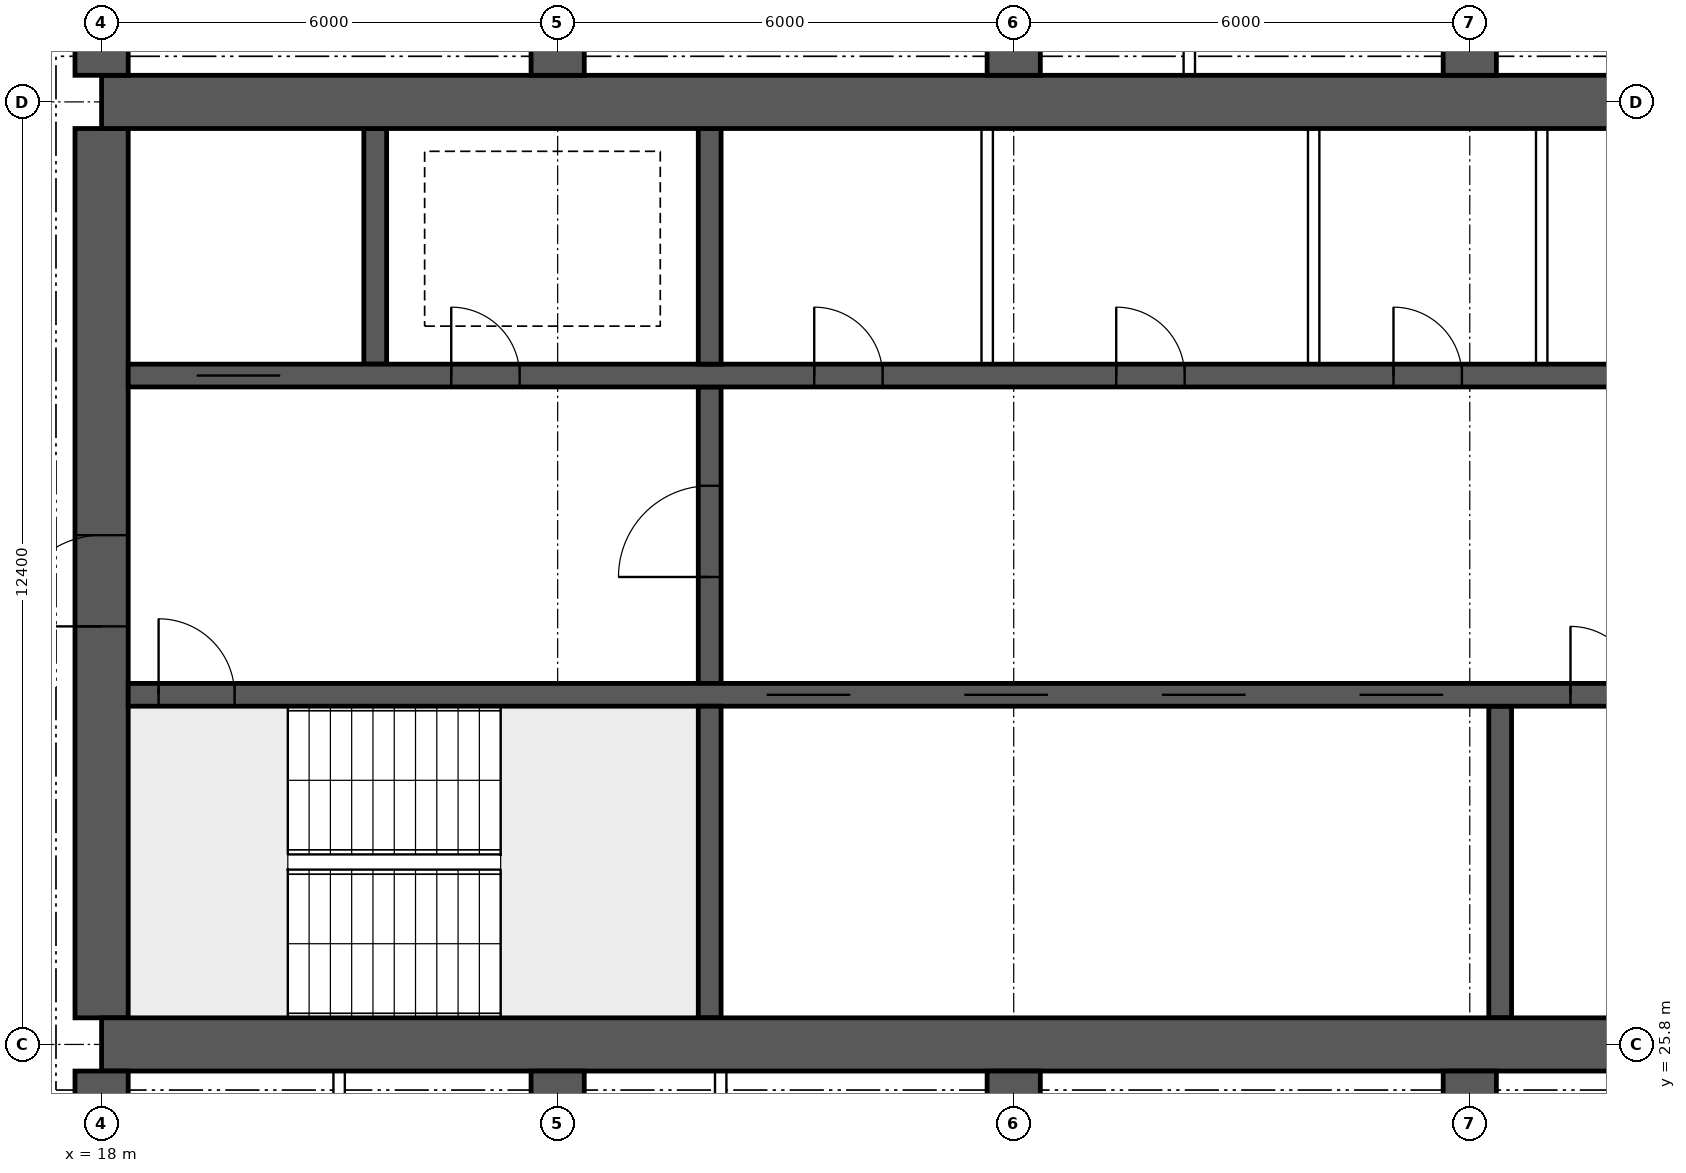
"""IFC4 building model, lengths in metres.
Left out: names, types, materials, properties, quantities, classifications, styles, units other than length and angle.
Written with IfcOpenShell. Run it as: python <this file> out.ifc"""

import sys

from ifc_helpers import new_model, si_unit, direction, frame, frame_2d, origin, place, context, subcontext, project, spatial, rectangle, extrude, element, fill, save


model = new_model("IFC4")
c1 = context("Model", 3, precision=1e-05, world=origin(), true_north=direction((0.0, 1.0)))
c2 = subcontext(c1, "Body", "Model", "MODEL_VIEW")
j1 = project(units=[si_unit("LENGTHUNIT", "METRE"), si_unit("PLANEANGLEUNIT", "RADIAN")], contexts=[c1])
p1 = place(None, origin())
s1 = spatial("IfcSite", under=j1, at=p1, CompositionType="ELEMENT")
p2 = place(p1, origin())
s2 = spatial("IfcBuilding", under=s1, at=p2, CompositionType="ELEMENT")
p3 = place(p2, frame((0.0, 0.0, 227.8)))
s3 = spatial("IfcBuildingStorey", under=s2, at=p3, CompositionType="ELEMENT", Elevation=227.8)
for number, where, z_axis, x_axis in (
    (1, (18.0, 25.8, 0.0), (0.0, 0.0, 1.0), (1.0, 0.0, 0.0)),
    (2, (18.0, 38.2, 0.0), (0.0, 0.0, 1.0), (1.0, 0.0, 0.0)),
):
    element("IfcWall", number, at=place(p3, frame(where, z_axis=z_axis, x_axis=x_axis)), inside=s3, PredefinedType="SHEAR", context=c2, shape_type="SweptSolid", body=[
        extrude(rectangle(XDim=48.0, YDim=0.7, at=frame_2d((24.0, 0.0))), origin(), (0.0, 0.0, 1.0), 3.75),
    ])
p4 = place(p3, frame((18.0, 26.15, 0.0), z_axis=(0.0, 0.0, 1.0), x_axis=(0.0, 1.0, 0.0)))
e3 = element("IfcWall", 3, at=p4, inside=s3, PredefinedType="SHEAR", context=c2, shape_type="SweptSolid", body=[
    extrude(rectangle(XDim=11.7, YDim=0.7, at=frame_2d((5.85, 0.0))), origin(), (0.0, 0.0, 1.0), 3.75),
])
p5 = place(p4, frame((5.15, 0.0, 0.0)))
e4 = element("IfcOpeningElement", 4, at=p5, cuts=e3, PredefinedType="OPENING", context=c2, shape_type="SweptSolid", body=[
    extrude(rectangle(XDim=1.2, YDim=2.1, at=frame_2d((0.6, 1.05))), frame((0.0, 0.36, 0.0), z_axis=(0.0, -1.0, 0.0), x_axis=(1.0, 0.0, 0.0)), (0.0, 0.0, 1.0), 0.72),
])
p6 = place(p3, frame((18.35, 30.4, 0.0), z_axis=(0.0, 0.0, 1.0), x_axis=(1.0, 0.0, 0.0)))
e5 = element("IfcWall", 5, at=p6, inside=s3, PredefinedType="SHEAR", context=c2, shape_type="SweptSolid", body=[
    extrude(rectangle(XDim=47.3, YDim=0.3, at=frame_2d((23.65, 0.0))), origin(), (0.0, 0.0, 1.0), 3.75),
])
p7 = place(p6, frame((0.4, 0.0, 0.0)))
e6 = element("IfcOpeningElement", 6, at=p7, cuts=e5, PredefinedType="OPENING", context=c2, shape_type="SweptSolid", body=[
    extrude(rectangle(XDim=1.0, YDim=2.1, at=frame_2d((0.5, 1.05))), frame((0.0, 0.16, 0.0), z_axis=(0.0, -1.0, 0.0), x_axis=(1.0, 0.0, 0.0)), (0.0, 0.0, 1.0), 0.32),
])
p8 = place(p6, frame((45.9, 0.0, 0.0)))
e7 = element("IfcOpeningElement", 7, at=p8, cuts=e5, PredefinedType="OPENING", context=c2, shape_type="SweptSolid", body=[
    extrude(rectangle(XDim=1.0, YDim=2.1, at=frame_2d((0.5, 1.05))), frame((0.0, 0.16, 0.0), z_axis=(0.0, -1.0, 0.0), x_axis=(1.0, 0.0, 0.0)), (0.0, 0.0, 1.0), 0.32),
])
p9 = place(p6, frame((8.4, 0.0, 0.0)))
e8 = element("IfcOpeningElement", 8, at=p9, cuts=e5, PredefinedType="OPENING", context=c2, shape_type="SweptSolid", body=[
    extrude(rectangle(XDim=1.1, YDim=2.1, at=frame_2d((0.55, 1.05))), frame((0.0, 0.16, 0.0), z_axis=(0.0, -1.0, 0.0), x_axis=(1.0, 0.0, 0.0)), (0.0, 0.0, 1.0), 0.32),
])
p10 = place(p6, frame((11.0, 0.0, 0.0)))
e9 = element("IfcOpeningElement", 9, at=p10, cuts=e5, PredefinedType="OPENING", context=c2, shape_type="SweptSolid", body=[
    extrude(rectangle(XDim=1.1, YDim=2.1, at=frame_2d((0.55, 1.05))), frame((0.0, 0.16, 0.0), z_axis=(0.0, -1.0, 0.0), x_axis=(1.0, 0.0, 0.0)), (0.0, 0.0, 1.0), 0.32),
])
p11 = place(p6, frame((13.6, 0.0, 0.0)))
e10 = element("IfcOpeningElement", 10, at=p11, cuts=e5, PredefinedType="OPENING", context=c2, shape_type="SweptSolid", body=[
    extrude(rectangle(XDim=1.1, YDim=2.1, at=frame_2d((0.55, 1.05))), frame((0.0, 0.16, 0.0), z_axis=(0.0, -1.0, 0.0), x_axis=(1.0, 0.0, 0.0)), (0.0, 0.0, 1.0), 0.32),
])
p12 = place(p6, frame((16.2, 0.0, 0.0)))
e11 = element("IfcOpeningElement", 11, at=p12, cuts=e5, PredefinedType="OPENING", context=c2, shape_type="SweptSolid", body=[
    extrude(rectangle(XDim=1.1, YDim=2.1, at=frame_2d((0.55, 1.05))), frame((0.0, 0.16, 0.0), z_axis=(0.0, -1.0, 0.0), x_axis=(1.0, 0.0, 0.0)), (0.0, 0.0, 1.0), 0.32),
])
p13 = place(p6, frame((18.975, 0.0, 0.0)))
e12 = element("IfcOpeningElement", 12, at=p13, cuts=e5, PredefinedType="OPENING", context=c2, shape_type="SweptSolid", body=[
    extrude(rectangle(XDim=0.9, YDim=2.1, at=frame_2d((0.45, 1.05))), frame((0.0, 0.16, 0.0), z_axis=(0.0, -1.0, 0.0), x_axis=(1.0, 0.0, 0.0)), (0.0, 0.0, 1.0), 0.32),
])
p14 = place(p6, frame((24.475, 0.0, 0.0)))
e13 = element("IfcOpeningElement", 13, at=p14, cuts=e5, PredefinedType="OPENING", context=c2, shape_type="SweptSolid", body=[
    extrude(rectangle(XDim=0.9, YDim=2.1, at=frame_2d((0.45, 1.05))), frame((0.0, 0.16, 0.0), z_axis=(0.0, -1.0, 0.0), x_axis=(1.0, 0.0, 0.0)), (0.0, 0.0, 1.0), 0.32),
])
p15 = place(p6, frame((30.267, 0.0, 0.0)))
e14 = element("IfcOpeningElement", 14, at=p15, cuts=e5, PredefinedType="OPENING", context=c2, shape_type="SweptSolid", body=[
    extrude(rectangle(XDim=1.1, YDim=2.1, at=frame_2d((0.55, 1.05))), frame((0.0, 0.16, 0.0), z_axis=(0.0, -1.0, 0.0), x_axis=(1.0, 0.0, 0.0)), (0.0, 0.0, 1.0), 0.32),
])
p16 = place(p6, frame((33.8, 0.0, 0.0)))
e15 = element("IfcOpeningElement", 15, at=p16, cuts=e5, PredefinedType="OPENING", context=c2, shape_type="SweptSolid", body=[
    extrude(rectangle(XDim=1.1, YDim=2.1, at=frame_2d((0.55, 1.05))), frame((0.0, 0.16, 0.0), z_axis=(0.0, -1.0, 0.0), x_axis=(1.0, 0.0, 0.0)), (0.0, 0.0, 1.0), 0.32),
])
p17 = place(p6, frame((37.333, 0.0, 0.0)))
e16 = element("IfcOpeningElement", 16, at=p17, cuts=e5, PredefinedType="OPENING", context=c2, shape_type="SweptSolid", body=[
    extrude(rectangle(XDim=1.1, YDim=2.1, at=frame_2d((0.55, 1.05))), frame((0.0, 0.16, 0.0), z_axis=(0.0, -1.0, 0.0), x_axis=(1.0, 0.0, 0.0)), (0.0, 0.0, 1.0), 0.32),
])
p18 = place(p3, frame((18.35, 34.6, 0.0), z_axis=(0.0, 0.0, 1.0), x_axis=(1.0, 0.0, 0.0)))
e17 = element("IfcWall", 17, at=p18, inside=s3, PredefinedType="SHEAR", context=c2, shape_type="SweptSolid", body=[
    extrude(rectangle(XDim=47.3, YDim=0.3, at=frame_2d((23.65, 0.0))), origin(), (0.0, 0.0, 1.0), 3.75),
])
p19 = place(p18, frame((0.9, 0.0, 0.0)))
e18 = element("IfcOpeningElement", 18, at=p19, cuts=e17, PredefinedType="OPENING", context=c2, shape_type="SweptSolid", body=[
    extrude(rectangle(XDim=1.1, YDim=2.1, at=frame_2d((0.55, 1.05))), frame((0.0, 0.16, 0.0), z_axis=(0.0, -1.0, 0.0), x_axis=(1.0, 0.0, 0.0)), (0.0, 0.0, 1.0), 0.32),
])
p20 = place(p18, frame((45.3, 0.0, 0.0)))
e19 = element("IfcOpeningElement", 19, at=p20, cuts=e17, PredefinedType="OPENING", context=c2, shape_type="SweptSolid", body=[
    extrude(rectangle(XDim=1.1, YDim=2.1, at=frame_2d((0.55, 1.05))), frame((0.0, 0.16, 0.0), z_axis=(0.0, -1.0, 0.0), x_axis=(1.0, 0.0, 0.0)), (0.0, 0.0, 1.0), 0.32),
])
p21 = place(p18, frame((4.25, 0.0, 0.0)))
e20 = element("IfcOpeningElement", 20, at=p21, cuts=e17, PredefinedType="OPENING", context=c2, shape_type="SweptSolid", body=[
    extrude(rectangle(XDim=0.9, YDim=2.1, at=frame_2d((0.45, 1.05))), frame((0.0, 0.16, 0.0), z_axis=(0.0, -1.0, 0.0), x_axis=(1.0, 0.0, 0.0)), (0.0, 0.0, 1.0), 0.32),
])
p22 = place(p18, frame((42.15, 0.0, 0.0)))
e21 = element("IfcOpeningElement", 21, at=p22, cuts=e17, PredefinedType="OPENING", context=c2, shape_type="SweptSolid", body=[
    extrude(rectangle(XDim=0.9, YDim=2.1, at=frame_2d((0.45, 1.05))), frame((0.0, 0.16, 0.0), z_axis=(0.0, -1.0, 0.0), x_axis=(1.0, 0.0, 0.0)), (0.0, 0.0, 1.0), 0.32),
])
p23 = place(p18, frame((9.025, 0.0, 0.0)))
e22 = element("IfcOpeningElement", 22, at=p23, cuts=e17, PredefinedType="OPENING", context=c2, shape_type="SweptSolid", body=[
    extrude(rectangle(XDim=0.9, YDim=2.1, at=frame_2d((0.45, 1.05))), frame((0.0, 0.16, 0.0), z_axis=(0.0, -1.0, 0.0), x_axis=(1.0, 0.0, 0.0)), (0.0, 0.0, 1.0), 0.32),
])
p24 = place(p18, frame((12.999, 0.0, 0.0)))
e23 = element("IfcOpeningElement", 23, at=p24, cuts=e17, PredefinedType="OPENING", context=c2, shape_type="SweptSolid", body=[
    extrude(rectangle(XDim=0.9, YDim=2.1, at=frame_2d((0.45, 1.05))), frame((0.0, 0.16, 0.0), z_axis=(0.0, -1.0, 0.0), x_axis=(1.0, 0.0, 0.0)), (0.0, 0.0, 1.0), 0.32),
])
p25 = place(p18, frame((16.646, 0.0, 0.0)))
e24 = element("IfcOpeningElement", 24, at=p25, cuts=e17, PredefinedType="OPENING", context=c2, shape_type="SweptSolid", body=[
    extrude(rectangle(XDim=0.9, YDim=2.1, at=frame_2d((0.45, 1.05))), frame((0.0, 0.16, 0.0), z_axis=(0.0, -1.0, 0.0), x_axis=(1.0, 0.0, 0.0)), (0.0, 0.0, 1.0), 0.32),
])
p26 = place(p18, frame((20.405, 0.0, 0.0)))
e25 = element("IfcOpeningElement", 25, at=p26, cuts=e17, PredefinedType="OPENING", context=c2, shape_type="SweptSolid", body=[
    extrude(rectangle(XDim=0.9, YDim=2.1, at=frame_2d((0.45, 1.05))), frame((0.0, 0.16, 0.0), z_axis=(0.0, -1.0, 0.0), x_axis=(1.0, 0.0, 0.0)), (0.0, 0.0, 1.0), 0.32),
])
p27 = place(p18, frame((24.811, 0.0, 0.0)))
e26 = element("IfcOpeningElement", 26, at=p27, cuts=e17, PredefinedType="OPENING", context=c2, shape_type="SweptSolid", body=[
    extrude(rectangle(XDim=0.9, YDim=2.1, at=frame_2d((0.45, 1.05))), frame((0.0, 0.16, 0.0), z_axis=(0.0, -1.0, 0.0), x_axis=(1.0, 0.0, 0.0)), (0.0, 0.0, 1.0), 0.32),
])
p28 = place(p18, frame((27.608, 0.0, 0.0)))
e27 = element("IfcOpeningElement", 27, at=p28, cuts=e17, PredefinedType="OPENING", context=c2, shape_type="SweptSolid", body=[
    extrude(rectangle(XDim=0.9, YDim=2.1, at=frame_2d((0.45, 1.05))), frame((0.0, 0.16, 0.0), z_axis=(0.0, -1.0, 0.0), x_axis=(1.0, 0.0, 0.0)), (0.0, 0.0, 1.0), 0.32),
])
p29 = place(p18, frame((33.729, 0.0, 0.0)))
e28 = element("IfcOpeningElement", 28, at=p29, cuts=e17, PredefinedType="OPENING", context=c2, shape_type="SweptSolid", body=[
    extrude(rectangle(XDim=0.9, YDim=2.1, at=frame_2d((0.45, 1.05))), frame((0.0, 0.16, 0.0), z_axis=(0.0, -1.0, 0.0), x_axis=(1.0, 0.0, 0.0)), (0.0, 0.0, 1.0), 0.32),
])
p30 = place(p3, frame((26.0, 26.15, 0.0), z_axis=(0.0, 0.0, 1.0), x_axis=(0.0, 1.0, 0.0)))
e29 = element("IfcWall", 29, at=p30, inside=s3, PredefinedType="SHEAR", context=c2, shape_type="SweptSolid", body=[
    extrude(rectangle(XDim=4.1, YDim=0.3, at=frame_2d((2.05, 0.0))), origin(), (0.0, 0.0, 1.0), 3.75),
])
p31 = place(p3, frame((26.0, 30.55, 0.0), z_axis=(0.0, 0.0, 1.0), x_axis=(0.0, 1.0, 0.0)))
e30 = element("IfcWall", 30, at=p31, inside=s3, PredefinedType="SHEAR", context=c2, shape_type="SweptSolid", body=[
    extrude(rectangle(XDim=3.9, YDim=0.3, at=frame_2d((1.95, 0.0))), origin(), (0.0, 0.0, 1.0), 3.75),
])
p32 = place(p31, frame((1.4, 0.0, 0.0)))
e31 = element("IfcOpeningElement", 31, at=p32, cuts=e30, PredefinedType="OPENING", context=c2, shape_type="SweptSolid", body=[
    extrude(rectangle(XDim=1.2, YDim=2.1, at=frame_2d((0.6, 1.05))), frame((0.0, 0.16, 0.0), z_axis=(0.0, -1.0, 0.0), x_axis=(1.0, 0.0, 0.0)), (0.0, 0.0, 1.0), 0.32),
])
for number, where, z_axis, x_axis in (
    (32, (21.6, 34.75, 0.0), (0.0, 0.0, 1.0), (0.0, 1.0, 0.0)),
    (33, (26.0, 34.75, 0.0), (0.0, 0.0, 1.0), (0.0, 1.0, 0.0)),
):
    element("IfcWall", number, at=place(p3, frame(where, z_axis=z_axis, x_axis=x_axis)), inside=s3, PredefinedType="SHEAR", context=c2, shape_type="SweptSolid", body=[
        extrude(rectangle(XDim=3.1, YDim=0.3, at=frame_2d((1.55, 0.0))), origin(), (0.0, 0.0, 1.0), 3.75),
    ])
p33 = place(p3, frame((36.4, 26.15, 0.0), z_axis=(0.0, 0.0, 1.0), x_axis=(0.0, 1.0, 0.0)))
e34 = element("IfcWall", 34, at=p33, inside=s3, PredefinedType="SHEAR", context=c2, shape_type="SweptSolid", body=[
    extrude(rectangle(XDim=4.1, YDim=0.3, at=frame_2d((2.05, 0.0))), origin(), (0.0, 0.0, 1.0), 3.75),
])
for number, where, z_axis, x_axis in (
    (35, (18.0, 18.4, 0.0), (0.0, 0.0, 1.0), (0.0, 1.0, 0.0)),
    (36, (18.0, 38.55, 0.0), (0.0, 0.0, 1.0), (0.0, 1.0, 0.0)),
    (37, (24.0, 18.4, 0.0), (0.0, 0.0, 1.0), (0.0, 1.0, 0.0)),
    (38, (24.0, 38.55, 0.0), (0.0, 0.0, 1.0), (0.0, 1.0, 0.0)),
    (39, (30.0, 18.4, 0.0), (0.0, 0.0, 1.0), (0.0, 1.0, 0.0)),
    (40, (30.0, 38.55, 0.0), (0.0, 0.0, 1.0), (0.0, 1.0, 0.0)),
    (41, (36.0, 18.4, 0.0), (0.0, 0.0, 1.0), (0.0, 1.0, 0.0)),
    (42, (36.0, 38.55, 0.0), (0.0, 0.0, 1.0), (0.0, 1.0, 0.0)),
):
    element("IfcWall", number, at=place(p3, frame(where, z_axis=z_axis, x_axis=x_axis)), inside=s3, PredefinedType="SHEAR", context=c2, shape_type="SweptSolid", body=[
        extrude(rectangle(XDim=7.05, YDim=0.7, at=frame_2d((3.525, 0.0))), origin(), (0.0, 0.0, 1.0), 3.75),
    ])
for number, where, z_axis, x_axis in (
    (43, (29.651, 34.75, 0.0), (0.0, 0.0, 1.0), (0.0, 1.0, 0.0)),
    (44, (33.946, 34.75, 0.0), (0.0, 0.0, 1.0), (0.0, 1.0, 0.0)),
    (45, (36.946, 34.75, 0.0), (0.0, 0.0, 1.0), (0.0, 1.0, 0.0)),
):
    element("IfcWall", number, at=place(p3, frame(where, z_axis=z_axis, x_axis=x_axis)), inside=s3, PredefinedType="SOLIDWALL", context=c2, shape_type="SweptSolid", body=[
        extrude(rectangle(XDim=3.1, YDim=0.15, at=frame_2d((1.55, 0.0))), origin(), (0.0, 0.0, 1.0), 3.3),
    ])
for number, where, z_axis, x_axis in (
    (46, (21.125, 18.5, 0.0), (0.0, 0.0, 1.0), (0.0, 1.0, 0.0)),
    (47, (26.145, 18.5, 0.0), (0.0, 0.0, 1.0), (0.0, 1.0, 0.0)),
    (48, (32.31, 38.55, 0.0), (0.0, 0.0, 1.0), (0.0, 1.0, 0.0)),
):
    element("IfcWall", number, at=place(p3, frame(where, z_axis=z_axis, x_axis=x_axis)), inside=s3, PredefinedType="PARTITIONING", context=c2, shape_type="SweptSolid", body=[
        extrude(rectangle(XDim=6.95, YDim=0.15, at=frame_2d((3.475, 0.0))), origin(), (0.0, 0.0, 1.0), 3.3),
    ])
p34 = place(p5, origin())
e49 = element("IfcDoor", 49, at=p34, inside=s3, OperationType="SINGLE_SWING_LEFT", PredefinedType="DOOR", context=c2, shape_type="SweptSolid", body=[
    extrude(rectangle(XDim=1.2, YDim=2.1, at=frame_2d((0.6, 1.05))), frame((0.0, 0.025, 0.0), z_axis=(0.0, -1.0, 0.0), x_axis=(1.0, 0.0, 0.0)), (0.0, 0.0, 1.0), 0.05),
])
fill(e4, e49)
p35 = place(p7, origin())
e50 = element("IfcDoor", 50, at=p35, inside=s3, OperationType="SINGLE_SWING_LEFT", PredefinedType="DOOR", context=c2, shape_type="SweptSolid", body=[
    extrude(rectangle(XDim=1.0, YDim=2.1, at=frame_2d((0.5, 1.05))), frame((0.0, 0.025, 0.0), z_axis=(0.0, -1.0, 0.0), x_axis=(1.0, 0.0, 0.0)), (0.0, 0.0, 1.0), 0.05),
])
fill(e6, e50)
p36 = place(p19, origin())
e51 = element("IfcDoor", 51, at=p36, inside=s3, OperationType="DOUBLE_DOOR_SLIDING", PredefinedType="DOOR", context=c2, shape_type="SweptSolid", body=[
    extrude(rectangle(XDim=1.1, YDim=2.1, at=frame_2d((0.55, 1.05))), frame((0.0, 0.025, 0.0), z_axis=(0.0, -1.0, 0.0), x_axis=(1.0, 0.0, 0.0)), (0.0, 0.0, 1.0), 0.05),
])
fill(e18, e51)
p37 = place(p21, origin())
e52 = element("IfcDoor", 52, at=p37, inside=s3, OperationType="SINGLE_SWING_LEFT", PredefinedType="DOOR", context=c2, shape_type="SweptSolid", body=[
    extrude(rectangle(XDim=0.9, YDim=2.1, at=frame_2d((0.45, 1.05))), frame((0.0, 0.025, 0.0), z_axis=(0.0, -1.0, 0.0), x_axis=(1.0, 0.0, 0.0)), (0.0, 0.0, 1.0), 0.05),
])
fill(e20, e52)
p38 = place(p32, origin())
e53 = element("IfcDoor", 53, at=p38, inside=s3, OperationType="SINGLE_SWING_LEFT", PredefinedType="DOOR", context=c2, shape_type="SweptSolid", body=[
    extrude(rectangle(XDim=1.2, YDim=2.1, at=frame_2d((0.6, 1.05))), frame((0.0, 0.025, 0.0), z_axis=(0.0, -1.0, 0.0), x_axis=(1.0, 0.0, 0.0)), (0.0, 0.0, 1.0), 0.05),
])
fill(e31, e53)
p39 = place(p23, origin())
e54 = element("IfcDoor", 54, at=p39, inside=s3, OperationType="SINGLE_SWING_LEFT", PredefinedType="DOOR", context=c2, shape_type="SweptSolid", body=[
    extrude(rectangle(XDim=0.9, YDim=2.1, at=frame_2d((0.45, 1.05))), frame((0.0, 0.025, 0.0), z_axis=(0.0, -1.0, 0.0), x_axis=(1.0, 0.0, 0.0)), (0.0, 0.0, 1.0), 0.05),
])
fill(e22, e54)
p40 = place(p24, origin())
e55 = element("IfcDoor", 55, at=p40, inside=s3, OperationType="SINGLE_SWING_LEFT", PredefinedType="DOOR", context=c2, shape_type="SweptSolid", body=[
    extrude(rectangle(XDim=0.9, YDim=2.1, at=frame_2d((0.45, 1.05))), frame((0.0, 0.025, 0.0), z_axis=(0.0, -1.0, 0.0), x_axis=(1.0, 0.0, 0.0)), (0.0, 0.0, 1.0), 0.05),
])
fill(e23, e55)
p41 = place(p25, origin())
e56 = element("IfcDoor", 56, at=p41, inside=s3, OperationType="SINGLE_SWING_LEFT", PredefinedType="DOOR", context=c2, shape_type="SweptSolid", body=[
    extrude(rectangle(XDim=0.9, YDim=2.1, at=frame_2d((0.45, 1.05))), frame((0.0, 0.025, 0.0), z_axis=(0.0, -1.0, 0.0), x_axis=(1.0, 0.0, 0.0)), (0.0, 0.0, 1.0), 0.05),
])
fill(e24, e56)
p42 = place(p9, origin())
e57 = element("IfcDoor", 57, at=p42, inside=s3, OperationType="DOUBLE_DOOR_SLIDING", PredefinedType="DOOR", context=c2, shape_type="SweptSolid", body=[
    extrude(rectangle(XDim=1.1, YDim=2.1, at=frame_2d((0.55, 1.05))), frame((0.0, 0.025, 0.0), z_axis=(0.0, -1.0, 0.0), x_axis=(1.0, 0.0, 0.0)), (0.0, 0.0, 1.0), 0.05),
])
fill(e8, e57)
p43 = place(p10, origin())
e58 = element("IfcDoor", 58, at=p43, inside=s3, OperationType="DOUBLE_DOOR_SLIDING", PredefinedType="DOOR", context=c2, shape_type="SweptSolid", body=[
    extrude(rectangle(XDim=1.1, YDim=2.1, at=frame_2d((0.55, 1.05))), frame((0.0, 0.025, 0.0), z_axis=(0.0, -1.0, 0.0), x_axis=(1.0, 0.0, 0.0)), (0.0, 0.0, 1.0), 0.05),
])
fill(e9, e58)
p44 = place(p11, origin())
e59 = element("IfcDoor", 59, at=p44, inside=s3, OperationType="DOUBLE_DOOR_SLIDING", PredefinedType="DOOR", context=c2, shape_type="SweptSolid", body=[
    extrude(rectangle(XDim=1.1, YDim=2.1, at=frame_2d((0.55, 1.05))), frame((0.0, 0.025, 0.0), z_axis=(0.0, -1.0, 0.0), x_axis=(1.0, 0.0, 0.0)), (0.0, 0.0, 1.0), 0.05),
])
fill(e10, e59)
p45 = place(p12, origin())
e60 = element("IfcDoor", 60, at=p45, inside=s3, OperationType="DOUBLE_DOOR_SLIDING", PredefinedType="DOOR", context=c2, shape_type="SweptSolid", body=[
    extrude(rectangle(XDim=1.1, YDim=2.1, at=frame_2d((0.55, 1.05))), frame((0.0, 0.025, 0.0), z_axis=(0.0, -1.0, 0.0), x_axis=(1.0, 0.0, 0.0)), (0.0, 0.0, 1.0), 0.05),
])
fill(e11, e60)
p46 = place(p13, origin())
e61 = element("IfcDoor", 61, at=p46, inside=s3, OperationType="SINGLE_SWING_LEFT", PredefinedType="DOOR", context=c2, shape_type="SweptSolid", body=[
    extrude(rectangle(XDim=0.9, YDim=2.1, at=frame_2d((0.45, 1.05))), frame((0.0, 0.025, 0.0), z_axis=(0.0, -1.0, 0.0), x_axis=(1.0, 0.0, 0.0)), (0.0, 0.0, 1.0), 0.05),
])
fill(e12, e61)
save(model, sys.argv[1])
